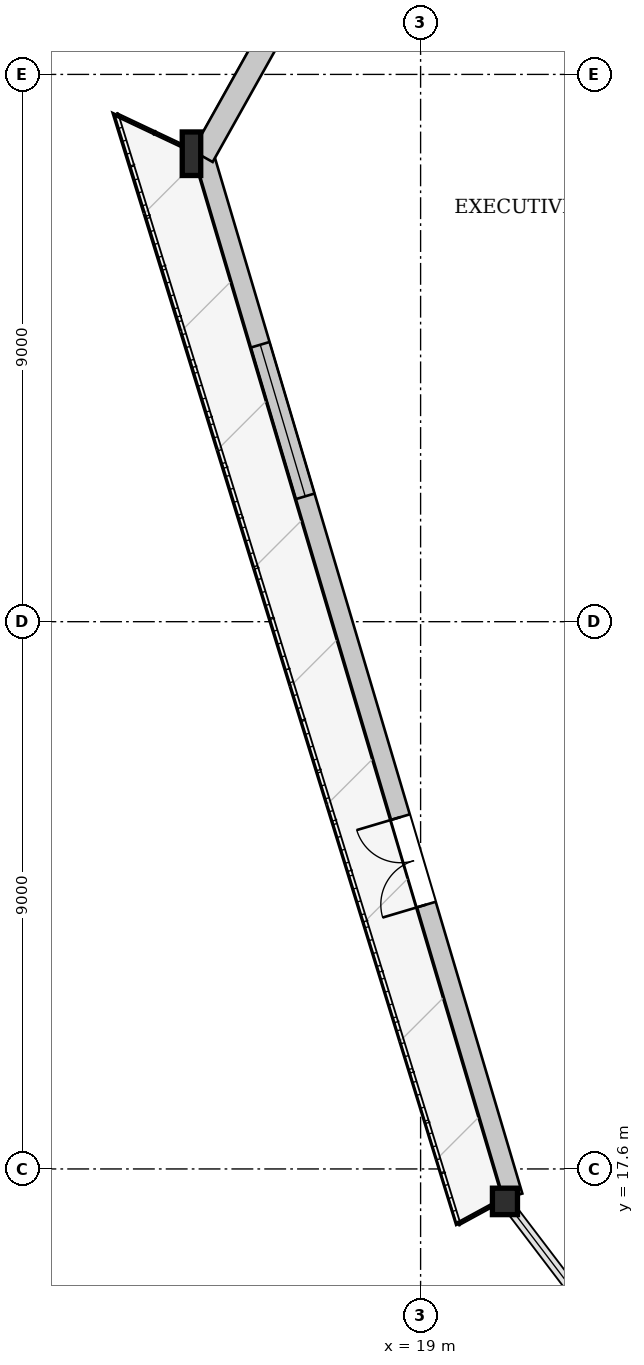
"""IFC4 building model, lengths in metres.
Left out: names, types, materials, properties, quantities, classifications, styles, units other than length and angle.
Written with IfcOpenShell. Run it as: python <this file> out.ifc"""

import sys

from ifc_helpers import new_model, si_unit, direction, frame, frame_2d, origin, origin_2d, place, context, subcontext, project, spatial, rectangle, i_section, extrude, source, transform, mapped, element, fill, save


model = new_model("IFC4")
c1 = context("Model", 3, precision=1e-05, world=origin(), true_north=direction((0.0, 1.0)))
c2 = subcontext(c1, "Body", "Model", "MODEL_VIEW")
j1 = project(units=[si_unit("LENGTHUNIT", "METRE"), si_unit("PLANEANGLEUNIT", "RADIAN")], contexts=[c1])
p1 = place(None, origin())
s1 = spatial("IfcSite", under=j1, at=p1, CompositionType="ELEMENT")
p2 = place(p1, origin())
s2 = spatial("IfcBuilding", under=s1, at=p2, CompositionType="ELEMENT")
p3 = place(p2, frame((0.0, 0.0, 153.7)))
s3 = spatial("IfcBuildingStorey", under=s2, at=p3, CompositionType="ELEMENT", Elevation=153.7)
m1 = source(origin(), c2, "Body", "SweptSolid", [
    extrude(i_section(OverallWidth=0.304, OverallDepth=0.716, WebThickness=0.021, FlangeThickness=0.04, at=origin_2d()), origin(), (0.0, 0.0, 1.0), 3.387),
])
p4 = place(p3, frame((15.249, 34.345, 0.0), z_axis=(-0.0098762592, -0.029340419668, 0.999520684767), x_axis=(0.947747735275, -0.319020736444, 0.0)))
e1 = element("IfcColumn", 1, at=p4, inside=s3, PredefinedType="COLUMN", context=c2, shape_type="MappedRepresentation", body=[
    mapped(m1, transform((0.0, 0.0, 0.0), x_axis=(1.0, 0.0, 0.0), y_axis=(0.0, 1.0, 0.0), z_axis=(0.0, 0.0, 1.0), scale=1.0)),
])
m2 = source(origin(), c2, "Body", "SweptSolid", [
    extrude(i_section(OverallWidth=0.412, OverallDepth=0.435, WebThickness=0.031, FlangeThickness=0.05, at=origin_2d()), origin(), (0.0, 0.0, 1.0), 3.386),
])
p5 = place(p3, frame((20.366, 17.105, 0.0), z_axis=(0.012329094266, -0.022711489437, 0.999666035075), x_axis=(0.878853431666, 0.477091862904, 0.0)))
e2 = element("IfcColumn", 2, at=p5, inside=s3, PredefinedType="COLUMN", context=c2, shape_type="MappedRepresentation", body=[
    mapped(m2, transform((0.0, 0.0, 0.0), x_axis=(1.0, 0.0, 0.0), y_axis=(0.0, 1.0, 0.0), z_axis=(0.0, 0.0, 1.0), scale=1.0)),
])
p6 = place(p3, frame((20.52, 17.15, 0.0), z_axis=(0.0, 0.0, 1.0), x_axis=(-0.284580549321, 0.958652132396, 0.0)))
e3 = element("IfcWall", 3, at=p6, inside=s3, PredefinedType="SOLIDWALL", context=c2, shape_type="SweptSolid", body=[
    extrude(rectangle(XDim=17.984, YDim=0.32, at=frame_2d((8.992, 0.0))), origin(), (0.0, 0.0, 1.0), 2.692),
])
p7 = place(p6, frame((5.005, 0.0, 0.0)))
e4 = element("IfcOpeningElement", 4, at=p7, cuts=e3, PredefinedType="OPENING", context=c2, shape_type="SweptSolid", body=[
    extrude(rectangle(XDim=1.5, YDim=2.3, at=frame_2d((0.75, 1.15))), frame((0.0, 0.17, 0.0), z_axis=(0.0, -1.0, 0.0), x_axis=(1.0, 0.0, 0.0)), (0.0, 0.0, 1.0), 0.34),
])
p8 = place(p6, frame((12.008, 0.0, 0.25)))
e5 = element("IfcOpeningElement", 5, at=p8, cuts=e3, PredefinedType="OPENING", context=c2, shape_type="SweptSolid", body=[
    extrude(rectangle(XDim=2.6, YDim=2.35, at=frame_2d((1.3, 1.175))), frame((0.0, 0.17, 0.0), z_axis=(0.0, -1.0, 0.0), x_axis=(1.0, 0.0, 0.0)), (0.0, 0.0, 1.0), 0.34),
])
p9 = place(p3, frame((15.414, 34.252, 0.0), z_axis=(0.0, 0.0, 1.0), x_axis=(0.488615426152, 0.872499263797, 0.0)))
e6 = element("IfcWall", 6, at=p9, inside=s3, PredefinedType="SOLIDWALL", context=c2, shape_type="SweptSolid", body=[
    extrude(rectangle(XDim=4.933, YDim=0.38, at=frame_2d((2.466, 0.0))), origin(), (0.0, 0.0, 1.0), 2.692),
])
m3 = source(origin(), c2, "Body", "SweptSolid", [
    extrude(rectangle(XDim=1.5, YDim=2.3, at=frame_2d((0.75, 1.15))), frame((0.0, 0.025, 0.0), z_axis=(0.0, -1.0, 0.0), x_axis=(1.0, 0.0, 0.0)), (0.0, 0.0, 1.0), 0.05),
])
p10 = place(p7, origin())
e7 = element("IfcDoor", 7, at=p10, inside=s3, OperationType="DOUBLE_DOOR_SINGLE_SWING", PredefinedType="DOOR", context=c2, shape_type="MappedRepresentation", body=[
    mapped(m3, transform((0.0, 0.0, 0.0), x_axis=(1.0, 0.0, 0.0), y_axis=(0.0, 1.0, 0.0), z_axis=(0.0, 0.0, 1.0), scale=1.0)),
])
fill(e4, e7)
m4 = source(origin(), c2, "Body", "SweptSolid", [
    extrude(rectangle(XDim=2.6, YDim=2.35, at=frame_2d((1.3, 1.175))), frame((0.0, 0.03, 0.0), z_axis=(0.0, -1.0, 0.0), x_axis=(1.0, 0.0, 0.0)), (0.0, 0.0, 1.0), 0.06),
])
p11 = place(p8, origin())
e8 = element("IfcWindow", 8, at=p11, inside=s3, PartitioningType="SINGLE_PANEL", PredefinedType="WINDOW", context=c2, shape_type="MappedRepresentation", body=[
    mapped(m4, transform((0.0, 0.0, 0.0), x_axis=(1.0, 0.0, 0.0), y_axis=(0.0, 1.0, 0.0), z_axis=(0.0, 0.0, 1.0), scale=1.0)),
])
fill(e5, e8)
save(model, sys.argv[1])
